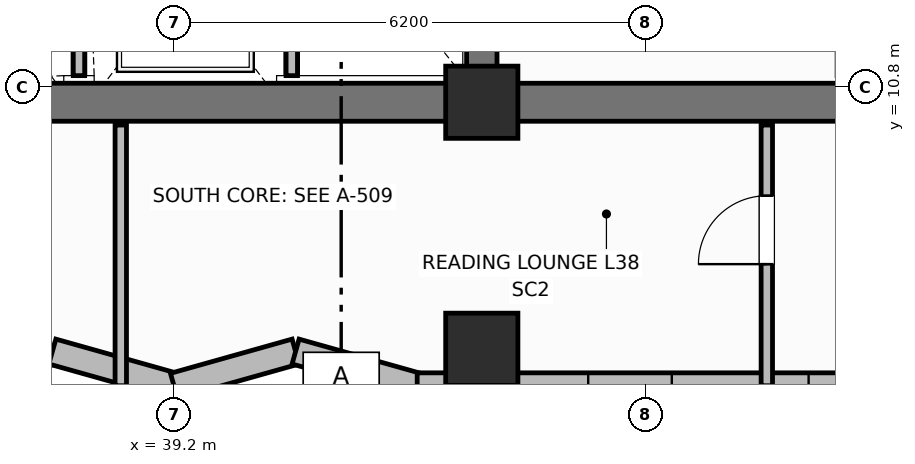
"""IFC4 building model, lengths in metres.
Left out: names, types, materials, properties, quantities, classifications, styles, units other than length and angle.
Written with IfcOpenShell. Run it as: python <this file> out.ifc"""

import sys

from ifc_helpers import new_model, si_unit, direction, frame, frame_2d, origin, origin_2d, place, context, subcontext, project, spatial, rectangle, extrude, element, fill, save


model = new_model("IFC4")
c1 = context("Model", 3, precision=1e-05, world=origin(), true_north=direction((0.0, 1.0)))
c2 = subcontext(c1, "Body", "Model", "MODEL_VIEW")
j1 = project(units=[si_unit("LENGTHUNIT", "METRE"), si_unit("PLANEANGLEUNIT", "RADIAN")], contexts=[c1])
p1 = place(None, origin())
s1 = spatial("IfcSite", under=j1, at=p1, CompositionType="ELEMENT")
p2 = place(p1, origin())
s2 = spatial("IfcBuilding", under=s1, at=p2, CompositionType="ELEMENT")
p3 = place(p2, frame((0.0, 0.0, 155.2)))
s3 = spatial("IfcBuildingStorey", under=s2, at=p3, CompositionType="ELEMENT", Elevation=155.2)
p4 = place(p3, frame((52.8, 10.6, 0.0), z_axis=(0.0, 0.0, 1.0), x_axis=(-1.0, 0.0, 0.0)))
e1 = element("IfcWall", 1, at=p4, inside=s3, PredefinedType="SHEAR", context=c2, shape_type="SweptSolid", body=[
    extrude(rectangle(XDim=27.2, YDim=0.5, at=frame_2d((13.6, 0.0))), origin(), (0.0, 0.0, 1.0), 3.7),
])
p5 = place(p3, frame((43.25, 10.85, 0.0), z_axis=(0.0, 0.0, 1.0), x_axis=(0.0, 1.0, 0.0)))
e2 = element("IfcWall", 2, at=p5, inside=s3, PredefinedType="SHEAR", context=c2, shape_type="SweptSolid", body=[
    extrude(rectangle(XDim=5.7, YDim=0.4, at=frame_2d((2.85, 0.0))), origin(), (0.0, 0.0, 1.0), 3.7),
])
for number, where, z_axis, x_axis in (
    (3, (43.25, 10.6, 0.0), (0.0, 0.0, 1.0), (1.0, 0.0, 0.0)),
    (4, (43.25, 7.35, 0.0), (0.0, 0.0, 1.0), (1.0, 0.0, 0.0)),
):
    element("IfcColumn", number, at=place(p3, frame(where, z_axis=z_axis, x_axis=x_axis)), inside=s3, PredefinedType="COLUMN", context=c2, shape_type="SweptSolid", body=[
        extrude(rectangle(XDim=0.95, YDim=0.95, at=origin_2d()), origin(), (0.0, 0.0, 1.0), 3.7),
    ])
p6 = place(p3, frame((36.0, 6.87, 0.0), z_axis=(0.0, 0.0, 1.0), x_axis=(0.962662902433, 0.270703040766, 0.0)))
e5 = element("IfcWall", 5, at=p6, inside=s3, PredefinedType="SOLIDWALL", context=c2, shape_type="SweptSolid", body=[
    extrude(rectangle(XDim=1.662, YDim=0.34, at=frame_2d((0.831, 0.0))), origin(), (0.0, 0.0, 1.0), 2.72),
])
p7 = place(p3, frame((37.6, 7.32, 0.0), z_axis=(0.0, 0.0, 1.0), x_axis=(0.962652136636, -0.270741322725, 0.0)))
e6 = element("IfcWall", 6, at=p7, inside=s3, PredefinedType="SOLIDWALL", context=c2, shape_type="SweptSolid", body=[
    extrude(rectangle(XDim=1.662, YDim=0.34, at=frame_2d((0.831, 0.0))), origin(), (0.0, 0.0, 1.0), 2.72),
])
p8 = place(p3, frame((39.2, 6.87, 0.0), z_axis=(0.0, 0.0, 1.0), x_axis=(0.962662902433, 0.270703040766, 0.0)))
e7 = element("IfcWall", 7, at=p8, inside=s3, PredefinedType="SOLIDWALL", context=c2, shape_type="SweptSolid", body=[
    extrude(rectangle(XDim=1.662, YDim=0.34, at=frame_2d((0.831, 0.0))), origin(), (0.0, 0.0, 1.0), 2.72),
])
p9 = place(p3, frame((40.8, 7.32, 0.0), z_axis=(0.0, 0.0, 1.0), x_axis=(0.962652136636, -0.270741322725, 0.0)))
e8 = element("IfcWall", 8, at=p9, inside=s3, PredefinedType="SOLIDWALL", context=c2, shape_type="SweptSolid", body=[
    extrude(rectangle(XDim=1.662, YDim=0.34, at=frame_2d((0.831, 0.0))), origin(), (0.0, 0.0, 1.0), 2.72),
])
p10 = place(p3, frame((42.4, 6.87, 0.0), z_axis=(0.0, 0.0, 1.0), x_axis=(1.0, 0.0, 0.0)))
e9 = element("IfcWall", 9, at=p10, inside=s3, PredefinedType="SOLIDWALL", context=c2, shape_type="SweptSolid", body=[
    extrude(rectangle(XDim=15.8, YDim=0.34, at=frame_2d((7.9, 0.0))), origin(), (0.0, 0.0, 1.0), 2.72),
])
p11 = place(p10, frame((2.25, 0.0, 0.95)))
e10 = element("IfcOpeningElement", 10, at=p11, cuts=e9, PredefinedType="OPENING", context=c2, shape_type="SweptSolid", body=[
    extrude(rectangle(XDim=1.1, YDim=1.65, at=frame_2d((0.55, 0.825))), frame((0.0, 0.18, 0.0), z_axis=(0.0, -1.0, 0.0), x_axis=(1.0, 0.0, 0.0)), (0.0, 0.0, 1.0), 0.36),
])
p12 = place(p10, frame((5.15, 0.0, 0.95)))
e11 = element("IfcOpeningElement", 11, at=p12, cuts=e9, PredefinedType="OPENING", context=c2, shape_type="SweptSolid", body=[
    extrude(rectangle(XDim=1.1, YDim=1.65, at=frame_2d((0.55, 0.825))), frame((0.0, 0.18, 0.0), z_axis=(0.0, -1.0, 0.0), x_axis=(1.0, 0.0, 0.0)), (0.0, 0.0, 1.0), 0.36),
])
p13 = place(p10, frame((7.35, 0.0, 0.95)))
e12 = element("IfcOpeningElement", 12, at=p13, cuts=e9, PredefinedType="OPENING", context=c2, shape_type="SweptSolid", body=[
    extrude(rectangle(XDim=1.1, YDim=1.65, at=frame_2d((0.55, 0.825))), frame((0.0, 0.18, 0.0), z_axis=(0.0, -1.0, 0.0), x_axis=(1.0, 0.0, 0.0)), (0.0, 0.0, 1.0), 0.36),
])
p14 = place(p10, frame((13.15, 0.0, 0.95)))
e13 = element("IfcOpeningElement", 13, at=p14, cuts=e9, PredefinedType="OPENING", context=c2, shape_type="SweptSolid", body=[
    extrude(rectangle(XDim=1.1, YDim=1.65, at=frame_2d((0.55, 0.825))), frame((0.0, 0.18, 0.0), z_axis=(0.0, -1.0, 0.0), x_axis=(1.0, 0.0, 0.0)), (0.0, 0.0, 1.0), 0.36),
])
for number, where, z_axis, x_axis in (
    (14, (37.95, 10.95, 0.0), (0.0, 0.0, 1.0), (0.0, 1.0, 0.0)),
    (15, (40.75, 10.95, 0.0), (0.0, 0.0, 1.0), (0.0, 1.0, 0.0)),
):
    element("IfcWall", number, at=place(p3, frame(where, z_axis=z_axis, x_axis=x_axis)), inside=s3, PredefinedType="PARTITIONING", context=c2, shape_type="SweptSolid", body=[
        extrude(rectangle(XDim=2.75, YDim=0.15, at=frame_2d((1.375, 0.0))), origin(), (0.0, 0.0, 1.0), 2.55),
    ])
p15 = place(p3, frame((38.5, 6.87, 0.0), z_axis=(0.0, 0.0, 1.0), x_axis=(0.0, 1.0, 0.0)))
e16 = element("IfcWall", 16, at=p15, inside=s3, PredefinedType="PARTITIONING", context=c2, shape_type="SweptSolid", body=[
    extrude(rectangle(XDim=3.43, YDim=0.15, at=frame_2d((1.715, 0.0))), origin(), (0.0, 0.0, 1.0), 2.55),
])
p16 = place(p3, frame((47.0, 6.87, 0.0), z_axis=(0.0, 0.0, 1.0), x_axis=(0.0, 1.0, 0.0)))
e17 = element("IfcWall", 17, at=p16, inside=s3, PredefinedType="PARTITIONING", context=c2, shape_type="SweptSolid", body=[
    extrude(rectangle(XDim=3.43, YDim=0.15, at=frame_2d((1.715, 0.0))), origin(), (0.0, 0.0, 1.0), 2.55),
])
p17 = place(p16, frame((1.6, 0.0, 0.0)))
e18 = element("IfcOpeningElement", 18, at=p17, cuts=e17, PredefinedType="OPENING", context=c2, shape_type="SweptSolid", body=[
    extrude(rectangle(XDim=0.9, YDim=2.1, at=frame_2d((0.45, 1.05))), frame((0.0, 0.085, 0.0), z_axis=(0.0, -1.0, 0.0), x_axis=(1.0, 0.0, 0.0)), (0.0, 0.0, 1.0), 0.17),
])
p18 = place(p11, origin())
e19 = element("IfcWindow", 19, at=p18, inside=s3, PartitioningType="SINGLE_PANEL", PredefinedType="WINDOW", context=c2, shape_type="SweptSolid", body=[
    extrude(rectangle(XDim=1.1, YDim=1.65, at=frame_2d((0.55, 0.825))), frame((0.0, 0.03, 0.0), z_axis=(0.0, -1.0, 0.0), x_axis=(1.0, 0.0, 0.0)), (0.0, 0.0, 1.0), 0.06),
])
fill(e10, e19)
p19 = place(p12, origin())
e20 = element("IfcWindow", 20, at=p19, inside=s3, PartitioningType="SINGLE_PANEL", PredefinedType="WINDOW", context=c2, shape_type="SweptSolid", body=[
    extrude(rectangle(XDim=1.1, YDim=1.65, at=frame_2d((0.55, 0.825))), frame((0.0, 0.03, 0.0), z_axis=(0.0, -1.0, 0.0), x_axis=(1.0, 0.0, 0.0)), (0.0, 0.0, 1.0), 0.06),
])
fill(e11, e20)
p20 = place(p17, origin())
e21 = element("IfcDoor", 21, at=p20, inside=s3, OperationType="SINGLE_SWING_LEFT", PredefinedType="DOOR", context=c2, shape_type="SweptSolid", body=[
    extrude(rectangle(XDim=0.9, YDim=2.1, at=frame_2d((0.45, 1.05))), frame((0.0, 0.025, 0.0), z_axis=(0.0, -1.0, 0.0), x_axis=(1.0, 0.0, 0.0)), (0.0, 0.0, 1.0), 0.05),
])
fill(e18, e21)
save(model, sys.argv[1])
